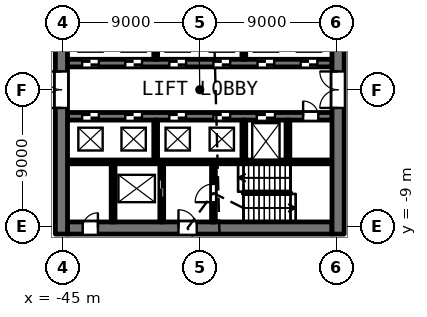
"""IFC4 building model, lengths in metres.
Left out: names, types, materials, properties, quantities, classifications, styles, units other than length and angle.
Written with IfcOpenShell. Run it as: python <this file> out.ifc"""

import sys

from ifc_helpers import new_model, si_unit, direction, frame, frame_2d, origin, place, context, subcontext, project, spatial, rectangle, extrude, element, fill, save


model = new_model("IFC4")
c1 = context("Model", 3, precision=1e-05, world=origin(), true_north=direction((0.0, 1.0)))
c2 = subcontext(c1, "Body", "Model", "MODEL_VIEW")
j1 = project(units=[si_unit("LENGTHUNIT", "METRE"), si_unit("PLANEANGLEUNIT", "RADIAN")], contexts=[c1])
p1 = place(None, origin())
s1 = spatial("IfcSite", under=j1, at=p1, CompositionType="ELEMENT")
p2 = place(p1, origin())
s2 = spatial("IfcBuilding", under=s1, at=p2, CompositionType="ELEMENT")
p3 = place(p2, origin())
s3 = spatial("IfcBuildingStorey", under=s2, at=p3, CompositionType="ELEMENT", Elevation=0.0)
p4 = place(p3, frame((-44.7, -9.1, 0.0), z_axis=(0.0, 0.0, 1.0), x_axis=(1.0, 0.0, 0.0)))
e1 = element("IfcWall", 1, at=p4, inside=s3, PredefinedType="SHEAR", context=c2, shape_type="SweptSolid", body=[
    extrude(rectangle(XDim=17.4, YDim=0.8, at=frame_2d((8.7, 0.0))), origin(), (0.0, 0.0, 1.0), 6.9),
])
p5 = place(p4, frame((7.3, 0.0, 0.0)))
e2 = element("IfcOpeningElement", 2, at=p5, cuts=e1, PredefinedType="OPENING", context=c2, shape_type="SweptSolid", body=[
    extrude(rectangle(XDim=1.2, YDim=2.1, at=frame_2d((0.6, 1.05))), frame((0.0, 0.41, 0.0), z_axis=(0.0, -1.0, 0.0), x_axis=(1.0, 0.0, 0.0)), (0.0, 0.0, 1.0), 0.82),
])
p6 = place(p4, frame((1.0, 0.0, 0.0)))
e3 = element("IfcOpeningElement", 3, at=p6, cuts=e1, PredefinedType="OPENING", context=c2, shape_type="SweptSolid", body=[
    extrude(rectangle(XDim=1.0, YDim=2.1, at=frame_2d((0.5, 1.05))), frame((0.0, 0.41, 0.0), z_axis=(0.0, -1.0, 0.0), x_axis=(1.0, 0.0, 0.0)), (0.0, 0.0, 1.0), 0.82),
])
p7 = place(p3, frame((-44.7, -4.75, 0.0), z_axis=(0.0, 0.0, 1.0), x_axis=(1.0, 0.0, 0.0)))
e4 = element("IfcWall", 4, at=p7, inside=s3, PredefinedType="SHEAR", context=c2, shape_type="SweptSolid", body=[
    extrude(rectangle(XDim=17.4, YDim=0.25, at=frame_2d((8.7, 0.0))), origin(), (0.0, 0.0, 1.0), 6.9),
])
p8 = place(p3, frame((-44.7, -1.75, 0.0), z_axis=(0.0, 0.0, 1.0), x_axis=(1.0, 0.0, 0.0)))
e5 = element("IfcWall", 5, at=p8, inside=s3, PredefinedType="SHEAR", context=c2, shape_type="SweptSolid", body=[
    extrude(rectangle(XDim=17.4, YDim=0.5, at=frame_2d((8.7, 0.0))), origin(), (0.0, 0.0, 1.0), 6.9),
])
p9 = place(p8, frame((0.962, 0.0, 0.0)))
e6 = element("IfcOpeningElement", 6, at=p9, cuts=e5, PredefinedType="OPENING", context=c2, shape_type="SweptSolid", body=[
    extrude(rectangle(XDim=1.1, YDim=2.1, at=frame_2d((0.55, 1.05))), frame((0.0, 0.26, 0.0), z_axis=(0.0, -1.0, 0.0), x_axis=(1.0, 0.0, 0.0)), (0.0, 0.0, 1.0), 0.52),
])
p10 = place(p8, frame((3.8, 0.0, 0.0)))
e7 = element("IfcOpeningElement", 7, at=p10, cuts=e5, PredefinedType="OPENING", context=c2, shape_type="SweptSolid", body=[
    extrude(rectangle(XDim=1.1, YDim=2.1, at=frame_2d((0.55, 1.05))), frame((0.0, 0.26, 0.0), z_axis=(0.0, -1.0, 0.0), x_axis=(1.0, 0.0, 0.0)), (0.0, 0.0, 1.0), 0.52),
])
p11 = place(p8, frame((6.7, 0.0, 0.0)))
e8 = element("IfcOpeningElement", 8, at=p11, cuts=e5, PredefinedType="OPENING", context=c2, shape_type="SweptSolid", body=[
    extrude(rectangle(XDim=1.1, YDim=2.1, at=frame_2d((0.55, 1.05))), frame((0.0, 0.26, 0.0), z_axis=(0.0, -1.0, 0.0), x_axis=(1.0, 0.0, 0.0)), (0.0, 0.0, 1.0), 0.52),
])
p12 = place(p8, frame((9.6, 0.0, 0.0)))
e9 = element("IfcOpeningElement", 9, at=p12, cuts=e5, PredefinedType="OPENING", context=c2, shape_type="SweptSolid", body=[
    extrude(rectangle(XDim=1.1, YDim=2.1, at=frame_2d((0.55, 1.05))), frame((0.0, 0.26, 0.0), z_axis=(0.0, -1.0, 0.0), x_axis=(1.0, 0.0, 0.0)), (0.0, 0.0, 1.0), 0.52),
])
p13 = place(p8, frame((12.45, 0.0, 0.0)))
e10 = element("IfcOpeningElement", 10, at=p13, cuts=e5, PredefinedType="OPENING", context=c2, shape_type="SweptSolid", body=[
    extrude(rectangle(XDim=1.2, YDim=2.1, at=frame_2d((0.6, 1.05))), frame((0.0, 0.26, 0.0), z_axis=(0.0, -1.0, 0.0), x_axis=(1.0, 0.0, 0.0)), (0.0, 0.0, 1.0), 0.52),
])
p14 = place(p8, frame((15.5, 0.0, 0.0)))
e11 = element("IfcOpeningElement", 11, at=p14, cuts=e5, PredefinedType="OPENING", context=c2, shape_type="SweptSolid", body=[
    extrude(rectangle(XDim=1.0, YDim=2.1, at=frame_2d((0.5, 1.05))), frame((0.0, 0.26, 0.0), z_axis=(0.0, -1.0, 0.0), x_axis=(1.0, 0.0, 0.0)), (0.0, 0.0, 1.0), 0.52),
])
p15 = place(p3, frame((-44.7, 1.75, 0.0), z_axis=(0.0, 0.0, 1.0), x_axis=(1.0, 0.0, 0.0)))
e12 = element("IfcWall", 12, at=p15, inside=s3, PredefinedType="SHEAR", context=c2, shape_type="SweptSolid", body=[
    extrude(rectangle(XDim=17.4, YDim=0.5, at=frame_2d((8.7, 0.0))), origin(), (0.0, 0.0, 1.0), 6.9),
])
p16 = place(p15, frame((0.962, 0.0, 0.0)))
e13 = element("IfcOpeningElement", 13, at=p16, cuts=e12, PredefinedType="OPENING", context=c2, shape_type="SweptSolid", body=[
    extrude(rectangle(XDim=1.1, YDim=2.1, at=frame_2d((0.55, 1.05))), frame((0.0, 0.26, 0.0), z_axis=(0.0, -1.0, 0.0), x_axis=(1.0, 0.0, 0.0)), (0.0, 0.0, 1.0), 0.52),
])
p17 = place(p15, frame((3.8, 0.0, 0.0)))
e14 = element("IfcOpeningElement", 14, at=p17, cuts=e12, PredefinedType="OPENING", context=c2, shape_type="SweptSolid", body=[
    extrude(rectangle(XDim=1.1, YDim=2.1, at=frame_2d((0.55, 1.05))), frame((0.0, 0.26, 0.0), z_axis=(0.0, -1.0, 0.0), x_axis=(1.0, 0.0, 0.0)), (0.0, 0.0, 1.0), 0.52),
])
p18 = place(p15, frame((6.7, 0.0, 0.0)))
e15 = element("IfcOpeningElement", 15, at=p18, cuts=e12, PredefinedType="OPENING", context=c2, shape_type="SweptSolid", body=[
    extrude(rectangle(XDim=1.1, YDim=2.1, at=frame_2d((0.55, 1.05))), frame((0.0, 0.26, 0.0), z_axis=(0.0, -1.0, 0.0), x_axis=(1.0, 0.0, 0.0)), (0.0, 0.0, 1.0), 0.52),
])
p19 = place(p15, frame((9.6, 0.0, 0.0)))
e16 = element("IfcOpeningElement", 16, at=p19, cuts=e12, PredefinedType="OPENING", context=c2, shape_type="SweptSolid", body=[
    extrude(rectangle(XDim=1.1, YDim=2.1, at=frame_2d((0.55, 1.05))), frame((0.0, 0.26, 0.0), z_axis=(0.0, -1.0, 0.0), x_axis=(1.0, 0.0, 0.0)), (0.0, 0.0, 1.0), 0.52),
])
p20 = place(p15, frame((12.5, 0.0, 0.0)))
e17 = element("IfcOpeningElement", 17, at=p20, cuts=e12, PredefinedType="OPENING", context=c2, shape_type="SweptSolid", body=[
    extrude(rectangle(XDim=1.1, YDim=2.1, at=frame_2d((0.55, 1.05))), frame((0.0, 0.26, 0.0), z_axis=(0.0, -1.0, 0.0), x_axis=(1.0, 0.0, 0.0)), (0.0, 0.0, 1.0), 0.52),
])
p21 = place(p15, frame((15.337, 0.0, 0.0)))
e18 = element("IfcOpeningElement", 18, at=p21, cuts=e12, PredefinedType="OPENING", context=c2, shape_type="SweptSolid", body=[
    extrude(rectangle(XDim=1.1, YDim=2.1, at=frame_2d((0.55, 1.05))), frame((0.0, 0.26, 0.0), z_axis=(0.0, -1.0, 0.0), x_axis=(1.0, 0.0, 0.0)), (0.0, 0.0, 1.0), 0.52),
])
p22 = place(p3, frame((-45.1, -9.5, 0.0), z_axis=(0.0, 0.0, 1.0), x_axis=(0.0, 1.0, 0.0)))
e19 = element("IfcWall", 19, at=p22, inside=s3, PredefinedType="SHEAR", context=c2, shape_type="SweptSolid", body=[
    extrude(rectangle(XDim=19.0, YDim=0.8, at=frame_2d((9.5, 0.0))), origin(), (0.0, 0.0, 1.0), 6.9),
])
p23 = place(p22, frame((8.3, 0.0, 0.0)))
e20 = element("IfcOpeningElement", 20, at=p23, cuts=e19, PredefinedType="OPENING", context=c2, shape_type="SweptSolid", body=[
    extrude(rectangle(XDim=2.4, YDim=2.1, at=frame_2d((1.2, 1.05))), frame((0.0, 0.41, 0.0), z_axis=(0.0, -1.0, 0.0), x_axis=(1.0, 0.0, 0.0)), (0.0, 0.0, 1.0), 0.82),
])
p24 = place(p3, frame((-41.7, -8.7, 0.0), z_axis=(0.0, 0.0, 1.0), x_axis=(0.0, 1.0, 0.0)))
e21 = element("IfcWall", 21, at=p24, inside=s3, PredefinedType="SHEAR", context=c2, shape_type="SweptSolid", body=[
    extrude(rectangle(XDim=3.825, YDim=0.25, at=frame_2d((1.913, 0.0))), origin(), (0.0, 0.0, 1.0), 6.9),
])
for number, where, z_axis, x_axis in (
    (22, (-38.9, -4.625, 0.0), (0.0, 0.0, 1.0), (0.0, 1.0, 0.0)),
    (23, (-38.9, 2.0, 0.0), (0.0, 0.0, 1.0), (0.0, 1.0, 0.0)),
):
    element("IfcWall", number, at=place(p3, frame(where, z_axis=z_axis, x_axis=x_axis)), inside=s3, PredefinedType="SHEAR", context=c2, shape_type="SweptSolid", body=[
        extrude(rectangle(XDim=2.625, YDim=0.25, at=frame_2d((1.312, 0.0))), origin(), (0.0, 0.0, 1.0), 6.9),
    ])
p25 = place(p3, frame((-38.5, -8.7, 0.0), z_axis=(0.0, 0.0, 1.0), x_axis=(0.0, 1.0, 0.0)))
e24 = element("IfcWall", 24, at=p25, inside=s3, PredefinedType="SHEAR", context=c2, shape_type="SweptSolid", body=[
    extrude(rectangle(XDim=3.825, YDim=0.25, at=frame_2d((1.913, 0.0))), origin(), (0.0, 0.0, 1.0), 6.9),
])
p26 = place(p25, frame((1.6, 0.0, 0.0)))
e25 = element("IfcOpeningElement", 25, at=p26, cuts=e24, PredefinedType="OPENING", context=c2, shape_type="SweptSolid", body=[
    extrude(rectangle(XDim=1.2, YDim=2.1, at=frame_2d((0.6, 1.05))), frame((0.0, 0.135, 0.0), z_axis=(0.0, -1.0, 0.0), x_axis=(1.0, 0.0, 0.0)), (0.0, 0.0, 1.0), 0.27),
])
p27 = place(p3, frame((-35.1, -8.7, 0.0), z_axis=(0.0, 0.0, 1.0), x_axis=(0.0, 1.0, 0.0)))
e26 = element("IfcWall", 26, at=p27, inside=s3, PredefinedType="SHEAR", context=c2, shape_type="SweptSolid", body=[
    extrude(rectangle(XDim=3.825, YDim=0.25, at=frame_2d((1.913, 0.0))), origin(), (0.0, 0.0, 1.0), 6.9),
])
p28 = place(p27, frame((1.3, 0.0, 0.0)))
e27 = element("IfcOpeningElement", 27, at=p28, cuts=e26, PredefinedType="OPENING", context=c2, shape_type="SweptSolid", body=[
    extrude(rectangle(XDim=1.2, YDim=2.1, at=frame_2d((0.6, 1.05))), frame((0.0, 0.135, 0.0), z_axis=(0.0, -1.0, 0.0), x_axis=(1.0, 0.0, 0.0)), (0.0, 0.0, 1.0), 0.27),
])
for number, where, z_axis, x_axis in (
    (28, (-33.1, -4.625, 0.0), (0.0, 0.0, 1.0), (0.0, 1.0, 0.0)),
    (29, (-33.1, 2.0, 0.0), (0.0, 0.0, 1.0), (0.0, 1.0, 0.0)),
    (30, (-30.2, -4.625, 0.0), (0.0, 0.0, 1.0), (0.0, 1.0, 0.0)),
):
    element("IfcWall", number, at=place(p3, frame(where, z_axis=z_axis, x_axis=x_axis)), inside=s3, PredefinedType="SHEAR", context=c2, shape_type="SweptSolid", body=[
        extrude(rectangle(XDim=2.625, YDim=0.25, at=frame_2d((1.312, 0.0))), origin(), (0.0, 0.0, 1.0), 6.9),
    ])
p29 = place(p3, frame((-26.9, -9.5, 0.0), z_axis=(0.0, 0.0, 1.0), x_axis=(0.0, 1.0, 0.0)))
e31 = element("IfcWall", 31, at=p29, inside=s3, PredefinedType="SHEAR", context=c2, shape_type="SweptSolid", body=[
    extrude(rectangle(XDim=19.0, YDim=0.8, at=frame_2d((9.5, 0.0))), origin(), (0.0, 0.0, 1.0), 6.9),
])
p30 = place(p29, frame((8.3, 0.0, 0.0)))
e32 = element("IfcOpeningElement", 32, at=p30, cuts=e31, PredefinedType="OPENING", context=c2, shape_type="SweptSolid", body=[
    extrude(rectangle(XDim=2.4, YDim=2.1, at=frame_2d((1.2, 1.05))), frame((0.0, 0.41, 0.0), z_axis=(0.0, -1.0, 0.0), x_axis=(1.0, 0.0, 0.0)), (0.0, 0.0, 1.0), 0.82),
])
p31 = place(p23, origin())
e33 = element("IfcDoor", 33, at=p31, inside=s3, OperationType="DOUBLE_DOOR_SINGLE_SWING", PredefinedType="DOOR", context=c2, shape_type="SweptSolid", body=[
    extrude(rectangle(XDim=2.4, YDim=2.1, at=frame_2d((1.2, 1.05))), frame((0.0, -0.225, 0.0), z_axis=(0.0, -1.0, 0.0), x_axis=(1.0, 0.0, 0.0)), (0.0, 0.0, 1.0), 0.05),
])
fill(e20, e33)
p32 = place(p30, origin())
e34 = element("IfcDoor", 34, at=p32, inside=s3, OperationType="DOUBLE_DOOR_SINGLE_SWING", PredefinedType="DOOR", context=c2, shape_type="SweptSolid", body=[
    extrude(rectangle(XDim=2.4, YDim=2.1, at=frame_2d((1.2, 1.05))), frame((0.0, 0.275, 0.0), z_axis=(0.0, -1.0, 0.0), x_axis=(1.0, 0.0, 0.0)), (0.0, 0.0, 1.0), 0.05),
])
fill(e32, e34)
p33 = place(p16, origin())
e35 = element("IfcDoor", 35, at=p33, inside=s3, OperationType="SLIDING_TO_LEFT", PredefinedType="DOOR", context=c2, shape_type="SweptSolid", body=[
    extrude(rectangle(XDim=1.1, YDim=2.1, at=frame_2d((0.55, 1.05))), frame((0.0, 0.025, 0.0), z_axis=(0.0, -1.0, 0.0), x_axis=(1.0, 0.0, 0.0)), (0.0, 0.0, 1.0), 0.05),
])
fill(e13, e35)
p34 = place(p17, origin())
e36 = element("IfcDoor", 36, at=p34, inside=s3, OperationType="SLIDING_TO_LEFT", PredefinedType="DOOR", context=c2, shape_type="SweptSolid", body=[
    extrude(rectangle(XDim=1.1, YDim=2.1, at=frame_2d((0.55, 1.05))), frame((0.0, 0.025, 0.0), z_axis=(0.0, -1.0, 0.0), x_axis=(1.0, 0.0, 0.0)), (0.0, 0.0, 1.0), 0.05),
])
fill(e14, e36)
p35 = place(p18, origin())
e37 = element("IfcDoor", 37, at=p35, inside=s3, OperationType="SLIDING_TO_LEFT", PredefinedType="DOOR", context=c2, shape_type="SweptSolid", body=[
    extrude(rectangle(XDim=1.1, YDim=2.1, at=frame_2d((0.55, 1.05))), frame((0.0, 0.025, 0.0), z_axis=(0.0, -1.0, 0.0), x_axis=(1.0, 0.0, 0.0)), (0.0, 0.0, 1.0), 0.05),
])
fill(e15, e37)
p36 = place(p19, origin())
e38 = element("IfcDoor", 38, at=p36, inside=s3, OperationType="SLIDING_TO_LEFT", PredefinedType="DOOR", context=c2, shape_type="SweptSolid", body=[
    extrude(rectangle(XDim=1.1, YDim=2.1, at=frame_2d((0.55, 1.05))), frame((0.0, 0.025, 0.0), z_axis=(0.0, -1.0, 0.0), x_axis=(1.0, 0.0, 0.0)), (0.0, 0.0, 1.0), 0.05),
])
fill(e16, e38)
p37 = place(p20, origin())
e39 = element("IfcDoor", 39, at=p37, inside=s3, OperationType="SLIDING_TO_LEFT", PredefinedType="DOOR", context=c2, shape_type="SweptSolid", body=[
    extrude(rectangle(XDim=1.1, YDim=2.1, at=frame_2d((0.55, 1.05))), frame((0.0, 0.025, 0.0), z_axis=(0.0, -1.0, 0.0), x_axis=(1.0, 0.0, 0.0)), (0.0, 0.0, 1.0), 0.05),
])
fill(e17, e39)
p38 = place(p21, origin())
e40 = element("IfcDoor", 40, at=p38, inside=s3, OperationType="SLIDING_TO_LEFT", PredefinedType="DOOR", context=c2, shape_type="SweptSolid", body=[
    extrude(rectangle(XDim=1.1, YDim=2.1, at=frame_2d((0.55, 1.05))), frame((0.0, 0.025, 0.0), z_axis=(0.0, -1.0, 0.0), x_axis=(1.0, 0.0, 0.0)), (0.0, 0.0, 1.0), 0.05),
])
fill(e18, e40)
p39 = place(p9, origin())
e41 = element("IfcDoor", 41, at=p39, inside=s3, OperationType="SLIDING_TO_LEFT", PredefinedType="DOOR", context=c2, shape_type="SweptSolid", body=[
    extrude(rectangle(XDim=1.1, YDim=2.1, at=frame_2d((0.55, 1.05))), frame((0.0, 0.025, 0.0), z_axis=(0.0, -1.0, 0.0), x_axis=(1.0, 0.0, 0.0)), (0.0, 0.0, 1.0), 0.05),
])
fill(e6, e41)
p40 = place(p10, origin())
e42 = element("IfcDoor", 42, at=p40, inside=s3, OperationType="SLIDING_TO_LEFT", PredefinedType="DOOR", context=c2, shape_type="SweptSolid", body=[
    extrude(rectangle(XDim=1.1, YDim=2.1, at=frame_2d((0.55, 1.05))), frame((0.0, 0.025, 0.0), z_axis=(0.0, -1.0, 0.0), x_axis=(1.0, 0.0, 0.0)), (0.0, 0.0, 1.0), 0.05),
])
fill(e7, e42)
p41 = place(p11, origin())
e43 = element("IfcDoor", 43, at=p41, inside=s3, OperationType="SLIDING_TO_LEFT", PredefinedType="DOOR", context=c2, shape_type="SweptSolid", body=[
    extrude(rectangle(XDim=1.1, YDim=2.1, at=frame_2d((0.55, 1.05))), frame((0.0, 0.025, 0.0), z_axis=(0.0, -1.0, 0.0), x_axis=(1.0, 0.0, 0.0)), (0.0, 0.0, 1.0), 0.05),
])
fill(e8, e43)
p42 = place(p12, origin())
e44 = element("IfcDoor", 44, at=p42, inside=s3, OperationType="SLIDING_TO_LEFT", PredefinedType="DOOR", context=c2, shape_type="SweptSolid", body=[
    extrude(rectangle(XDim=1.1, YDim=2.1, at=frame_2d((0.55, 1.05))), frame((0.0, 0.025, 0.0), z_axis=(0.0, -1.0, 0.0), x_axis=(1.0, 0.0, 0.0)), (0.0, 0.0, 1.0), 0.05),
])
fill(e9, e44)
p43 = place(p13, origin())
e45 = element("IfcDoor", 45, at=p43, inside=s3, OperationType="SLIDING_TO_LEFT", PredefinedType="DOOR", context=c2, shape_type="SweptSolid", body=[
    extrude(rectangle(XDim=1.2, YDim=2.1, at=frame_2d((0.6, 1.05))), frame((0.0, 0.025, 0.0), z_axis=(0.0, -1.0, 0.0), x_axis=(1.0, 0.0, 0.0)), (0.0, 0.0, 1.0), 0.05),
])
fill(e10, e45)
p44 = place(p26, origin())
e46 = element("IfcDoor", 46, at=p44, inside=s3, OperationType="SLIDING_TO_LEFT", PredefinedType="DOOR", context=c2, shape_type="SweptSolid", body=[
    extrude(rectangle(XDim=1.2, YDim=2.1, at=frame_2d((0.6, 1.05))), frame((0.0, 0.025, 0.0), z_axis=(0.0, -1.0, 0.0), x_axis=(1.0, 0.0, 0.0)), (0.0, 0.0, 1.0), 0.05),
])
fill(e25, e46)
p45 = place(p14, origin())
e47 = element("IfcDoor", 47, at=p45, inside=s3, OperationType="SINGLE_SWING_LEFT", PredefinedType="DOOR", context=c2, shape_type="SweptSolid", body=[
    extrude(rectangle(XDim=1.0, YDim=2.1, at=frame_2d((0.5, 1.05))), frame((0.0, 0.025, 0.0), z_axis=(0.0, -1.0, 0.0), x_axis=(1.0, 0.0, 0.0)), (0.0, 0.0, 1.0), 0.05),
])
fill(e11, e47)
p46 = place(p28, origin())
e48 = element("IfcDoor", 48, at=p46, inside=s3, OperationType="SINGLE_SWING_LEFT", PredefinedType="DOOR", context=c2, shape_type="SweptSolid", body=[
    extrude(rectangle(XDim=1.2, YDim=2.1, at=frame_2d((0.6, 1.05))), frame((0.0, 0.025, 0.0), z_axis=(0.0, -1.0, 0.0), x_axis=(1.0, 0.0, 0.0)), (0.0, 0.0, 1.0), 0.05),
])
fill(e27, e48)
p47 = place(p5, origin())
e49 = element("IfcDoor", 49, at=p47, inside=s3, OperationType="SINGLE_SWING_LEFT", PredefinedType="DOOR", context=c2, shape_type="SweptSolid", body=[
    extrude(rectangle(XDim=1.2, YDim=2.1, at=frame_2d((0.6, 1.05))), frame((0.0, 0.275, 0.0), z_axis=(0.0, -1.0, 0.0), x_axis=(1.0, 0.0, 0.0)), (0.0, 0.0, 1.0), 0.05),
])
fill(e2, e49)
p48 = place(p6, origin())
e50 = element("IfcDoor", 50, at=p48, inside=s3, OperationType="SINGLE_SWING_RIGHT", PredefinedType="DOOR", context=c2, shape_type="SweptSolid", body=[
    extrude(rectangle(XDim=1.0, YDim=2.1, at=frame_2d((0.5, 1.05))), frame((0.0, 0.275, 0.0), z_axis=(0.0, -1.0, 0.0), x_axis=(1.0, 0.0, 0.0)), (0.0, 0.0, 1.0), 0.05),
])
fill(e3, e50)
save(model, sys.argv[1])
